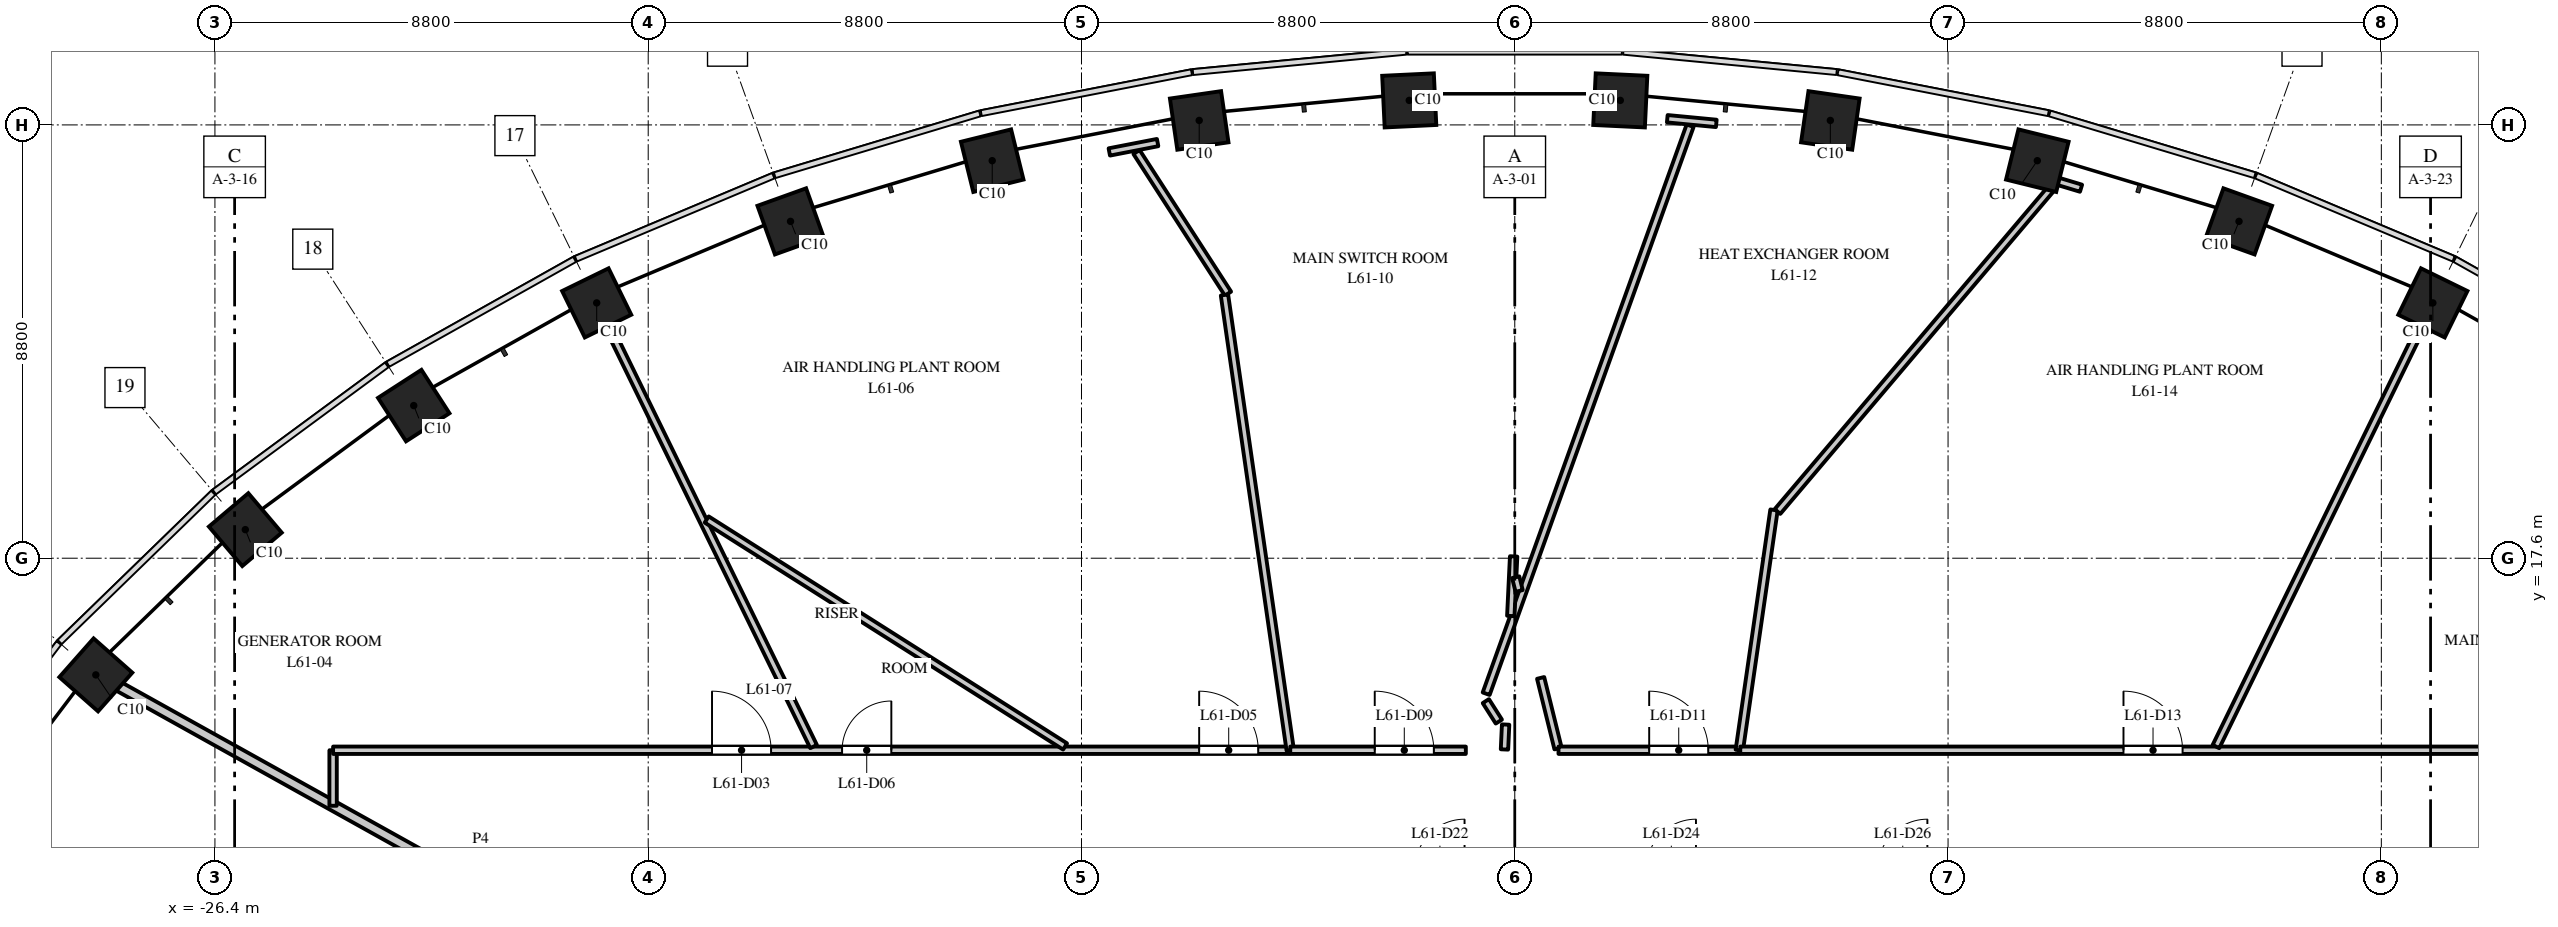
"""IFC4 building model, lengths in metres.
Left out: names, types, materials, properties, quantities, classifications, styles, units other than length and angle.
Written with IfcOpenShell. Run it as: python <this file> out.ifc"""

import sys

from ifc_helpers import new_model, si_unit, direction, frame, frame_2d, origin, origin_2d, place, context, subcontext, project, spatial, rectangle, extrude, element, fill, save


model = new_model("IFC4")
c1 = context("Model", 3, precision=1e-05, world=origin(), true_north=direction((0.0, 1.0)))
c2 = subcontext(c1, "Body", "Model", "MODEL_VIEW")
j1 = project(units=[si_unit("LENGTHUNIT", "METRE"), si_unit("PLANEANGLEUNIT", "RADIAN")], contexts=[c1])
p1 = place(None, origin())
s1 = spatial("IfcSite", under=j1, at=p1, CompositionType="ELEMENT")
p2 = place(p1, origin())
s2 = spatial("IfcBuilding", under=s1, at=p2, CompositionType="ELEMENT")
p3 = place(p2, frame((0.0, 0.0, 285.5)))
s3 = spatial("IfcBuildingStorey", under=s2, at=p3, CompositionType="ELEMENT", Elevation=285.5)
for number, where, z_axis, x_axis in (
    (1, (18.646, 22.785, 0.0), (0.0, 0.0, 1.0), (-0.898, 0.439, 0.0)),
    (2, (14.709, 24.441, 0.0), (0.0, 0.0, 1.0), (-0.941, 0.338, 0.0)),
    (3, (10.613, 25.674, 0.0), (0.0, 0.0, 1.0), (-0.971, 0.24, 0.0)),
    (4, (6.409, 26.491, 0.0), (0.0, 0.0, 1.0), (-0.99, 0.143, 0.0)),
    (5, (2.143, 26.898, 0.0), (0.0, 0.0, 1.0), (-0.999, 0.048, 0.0)),
    (6, (-2.143, 26.898, 0.0), (0.0, 0.0, 1.0), (-0.999, -0.048, 0.0)),
    (7, (-6.409, 26.491, 0.0), (0.0, 0.0, 1.0), (-0.99, -0.143, 0.0)),
    (8, (-10.613, 25.674, 0.0), (0.0, 0.0, 1.0), (-0.971, -0.24, 0.0)),
    (9, (-14.709, 24.441, 0.0), (0.0, 0.0, 1.0), (-0.941, -0.338, 0.0)),
    (10, (-18.646, 22.785, 0.0), (0.0, 0.0, 1.0), (-0.898, -0.439, 0.0)),
    (11, (-22.362, 20.7, 0.0), (0.0, 0.0, 1.0), (-0.84, -0.542, 0.0)),
    (12, (-25.783, 18.18, 0.0), (0.0, 0.0, 1.0), (-0.763, -0.646, 0.0)),
    (13, (-28.819, 15.23, 0.0), (0.0, 0.0, 1.0), (-0.663, -0.749, 0.0)),
):
    element("IfcColumn", number, at=place(p3, frame(where, z_axis=z_axis, x_axis=x_axis)), inside=s3, PredefinedType="COLUMN", context=c2, shape_type="SweptSolid", body=[
        extrude(rectangle(XDim=1.05, YDim=1.05, at=origin_2d()), origin(), (0.0, 0.0, 1.0), 5.5),
    ])
p4 = place(p3, frame((-28.893, 15.297, 0.0), z_axis=(0.0, 0.0, 1.0), x_axis=(0.873687771475, -0.486487078939, 0.0)))
e14 = element("IfcWall", 14, at=p4, inside=s3, PredefinedType="PARTITIONING", context=c2, shape_type="SweptSolid", body=[
    extrude(rectangle(XDim=9.034, YDim=0.2, at=frame_2d((4.517, 0.0))), origin(), (0.0, 0.0, 1.0), 5.2),
])
p5 = place(p3, frame((-24.0, 12.573, 0.0), z_axis=(0.0, 0.0, 1.0), x_axis=(0.0, 1.0, 0.0)))
e15 = element("IfcWall", 15, at=p5, inside=s3, PredefinedType="PARTITIONING", context=c2, shape_type="SweptSolid", body=[
    extrude(rectangle(XDim=1.127, YDim=0.15, at=frame_2d((0.564, 0.0))), origin(), (0.0, 0.0, 1.0), 5.2),
])
p6 = place(p3, frame((-24.0, 13.7, 0.0), z_axis=(0.0, 0.0, 1.0), x_axis=(1.0, 0.0, 0.0)))
e16 = element("IfcWall", 16, at=p6, inside=s3, PredefinedType="PARTITIONING", context=c2, shape_type="SweptSolid", body=[
    extrude(rectangle(XDim=19.42, YDim=0.15, at=frame_2d((9.71, 0.0))), origin(), (0.0, 0.0, 1.0), 4.25),
])
p7 = place(p6, frame((7.696, 0.0, 0.0)))
e17 = element("IfcOpeningElement", 17, at=p7, cuts=e16, PredefinedType="OPENING", context=c2, shape_type="SweptSolid", body=[
    extrude(rectangle(XDim=1.2, YDim=2.1, at=frame_2d((0.6, 1.05))), frame((0.0, 0.085, 0.0), z_axis=(0.0, -1.0, 0.0), x_axis=(1.0, 0.0, 0.0)), (0.0, 0.0, 1.0), 0.17),
])
p8 = place(p6, frame((17.59, 0.0, 0.0)))
e18 = element("IfcOpeningElement", 18, at=p8, cuts=e16, PredefinedType="OPENING", context=c2, shape_type="SweptSolid", body=[
    extrude(rectangle(XDim=1.2, YDim=2.1, at=frame_2d((0.6, 1.05))), frame((0.0, 0.085, 0.0), z_axis=(0.0, -1.0, 0.0), x_axis=(1.0, 0.0, 0.0)), (0.0, 0.0, 1.0), 0.17),
])
p9 = place(p6, frame((10.338, 0.0, 0.0)))
e19 = element("IfcOpeningElement", 19, at=p9, cuts=e16, PredefinedType="OPENING", context=c2, shape_type="SweptSolid", body=[
    extrude(rectangle(XDim=1.0, YDim=2.1, at=frame_2d((0.5, 1.05))), frame((0.0, 0.085, 0.0), z_axis=(0.0, -1.0, 0.0), x_axis=(1.0, 0.0, 0.0)), (0.0, 0.0, 1.0), 0.17),
])
p10 = place(p3, frame((-18.69, 22.875, 0.0), z_axis=(0.0, 0.0, 1.0), x_axis=(0.439213157978, -0.898382881548, 0.0)))
e20 = element("IfcWall", 20, at=p10, inside=s3, PredefinedType="PARTITIONING", context=c2, shape_type="SweptSolid", body=[
    extrude(rectangle(XDim=10.129, YDim=0.15, at=frame_2d((5.065, 0.0))), origin(), (0.0, 0.0, 1.0), 4.35),
])
p11 = place(p3, frame((-16.412, 18.386, 0.0), z_axis=(0.0, 0.0, 1.0), x_axis=(0.844880980816, -0.534954323523, 0.0)))
e21 = element("IfcWall", 21, at=p11, inside=s3, PredefinedType="PARTITIONING", context=c2, shape_type="SweptSolid", body=[
    extrude(rectangle(XDim=8.615, YDim=0.15, at=frame_2d((4.308, 0.0))), origin(), (0.0, 0.0, 1.0), 4.35),
])
p12 = place(p3, frame((-7.683, 25.85, 0.0), z_axis=(0.0, 0.0, 1.0), x_axis=(0.542618686321, -0.839979143346, 0.0)))
e22 = element("IfcWall", 22, at=p12, inside=s3, PredefinedType="PARTITIONING", context=c2, shape_type="SweptSolid", body=[
    extrude(rectangle(XDim=3.425, YDim=0.15, at=frame_2d((1.713, 0.0))), origin(), (0.0, 0.0, 1.0), 4.4),
])
p13 = place(p3, frame((-5.896, 22.946, 0.0), z_axis=(0.0, 0.0, 1.0), x_axis=(0.143001721329, -0.989722439726, 0.0)))
e23 = element("IfcWall", 23, at=p13, inside=s3, PredefinedType="PARTITIONING", context=c2, shape_type="SweptSolid", body=[
    extrude(rectangle(XDim=9.342, YDim=0.15, at=frame_2d((4.671, 0.0))), origin(), (0.0, 0.0, 1.0), 5.2),
])
p14 = place(p3, frame((-4.56, 13.7, 0.0), z_axis=(0.0, 0.0, 1.0), x_axis=(1.0, 0.0, 0.0)))
e24 = element("IfcWall", 24, at=p14, inside=s3, PredefinedType="PARTITIONING", context=c2, shape_type="SweptSolid", body=[
    extrude(rectangle(XDim=3.566, YDim=0.15, at=frame_2d((1.783, 0.0))), origin(), (0.0, 0.0, 1.0), 4.35),
])
p15 = place(p14, frame((1.716, 0.0, 0.0)))
e25 = element("IfcOpeningElement", 25, at=p15, cuts=e24, PredefinedType="OPENING", context=c2, shape_type="SweptSolid", body=[
    extrude(rectangle(XDim=1.2, YDim=2.1, at=frame_2d((0.6, 1.05))), frame((0.0, 0.085, 0.0), z_axis=(0.0, -1.0, 0.0), x_axis=(1.0, 0.0, 0.0)), (0.0, 0.0, 1.0), 0.17),
])
p16 = place(p3, frame((-0.581, 14.848, 0.0), z_axis=(0.0, 0.0, 1.0), x_axis=(0.337959757209, 0.941160561492, 0.0)))
e26 = element("IfcWall", 26, at=p16, inside=s3, PredefinedType="PARTITIONING", context=c2, shape_type="SweptSolid", body=[
    extrude(rectangle(XDim=12.258, YDim=0.15, at=frame_2d((6.129, 0.0))), origin(), (0.0, 0.0, 1.0), 4.4),
])
p17 = place(p3, frame((-0.209, 13.716, 0.0), z_axis=(0.0, 0.0, 1.0), x_axis=(0.045320181561, 0.998972512707, 0.0)))
e27 = element("IfcWall", 27, at=p17, inside=s3, PredefinedType="PARTITIONING", context=c2, shape_type="SweptSolid", body=[
    extrude(rectangle(XDim=0.506, YDim=0.15, at=frame_2d((0.253, 0.0))), origin(), (0.0, 0.0, 1.0), 5.2),
])
p18 = place(p3, frame((-0.081, 16.427, 0.0), z_axis=(0.0, 0.0, 1.0), x_axis=(0.047967320325, 0.998848905581, 0.0)))
e28 = element("IfcWall", 28, at=p18, inside=s3, PredefinedType="PARTITIONING", context=c2, shape_type="SweptSolid", body=[
    extrude(rectangle(XDim=1.211, YDim=0.15, at=frame_2d((0.606, 0.0))), origin(), (0.0, 0.0, 1.0), 5.2),
])
p19 = place(p3, frame((0.019, 17.215, 0.0), z_axis=(0.0, 0.0, 1.0), x_axis=(0.242734623519, -0.970092728838, 0.0)))
e29 = element("IfcWall", 29, at=p19, inside=s3, PredefinedType="PARTITIONING", context=c2, shape_type="SweptSolid", body=[
    extrude(rectangle(XDim=0.289, YDim=0.15, at=frame_2d((0.144, 0.0))), origin(), (0.0, 0.0, 1.0), 5.2),
])
p20 = place(p3, frame((0.525, 15.169, 0.0), z_axis=(0.0, 0.0, 1.0), x_axis=(0.239695194895, -0.970848192842, 0.0)))
e30 = element("IfcWall", 30, at=p20, inside=s3, PredefinedType="PARTITIONING", context=c2, shape_type="SweptSolid", body=[
    extrude(rectangle(XDim=1.477, YDim=0.15, at=frame_2d((0.738, 0.0))), origin(), (0.0, 0.0, 1.0), 5.2),
])
p21 = place(p3, frame((0.888, 13.7, 0.0), z_axis=(0.0, 0.0, 1.0), x_axis=(1.0, 0.0, 0.0)))
e31 = element("IfcWall", 31, at=p21, inside=s3, PredefinedType="PARTITIONING", context=c2, shape_type="SweptSolid", body=[
    extrude(rectangle(XDim=3.672, YDim=0.15, at=frame_2d((1.836, 0.0))), origin(), (0.0, 0.0, 1.0), 4.35),
])
p22 = place(p21, frame((1.842, 0.0, 0.0)))
e32 = element("IfcOpeningElement", 32, at=p22, cuts=e31, PredefinedType="OPENING", context=c2, shape_type="SweptSolid", body=[
    extrude(rectangle(XDim=1.2, YDim=2.1, at=frame_2d((0.6, 1.05))), frame((0.0, 0.085, 0.0), z_axis=(0.0, -1.0, 0.0), x_axis=(1.0, 0.0, 0.0)), (0.0, 0.0, 1.0), 0.17),
])
p23 = place(p3, frame((4.56, 13.7, 0.0), z_axis=(0.0, 0.0, 1.0), x_axis=(0.142946212099, 0.989730458482, 0.0)))
e33 = element("IfcWall", 33, at=p23, inside=s3, PredefinedType="PARTITIONING", context=c2, shape_type="SweptSolid", body=[
    extrude(rectangle(XDim=4.931, YDim=0.15, at=frame_2d((2.465, 0.0))), origin(), (0.0, 0.0, 1.0), 5.2),
])
p24 = place(p3, frame((4.58, 13.7, 0.0), z_axis=(0.0, 0.0, 1.0), x_axis=(1.0, 0.0, 0.0)))
e34 = element("IfcWall", 34, at=p24, inside=s3, PredefinedType="PARTITIONING", context=c2, shape_type="SweptSolid", body=[
    extrude(rectangle(XDim=19.42, YDim=0.15, at=frame_2d((9.71, 0.0))), origin(), (0.0, 0.0, 1.0), 4.35),
])
p25 = place(p24, frame((7.783, 0.0, 0.0)))
e35 = element("IfcOpeningElement", 35, at=p25, cuts=e34, PredefinedType="OPENING", context=c2, shape_type="SweptSolid", body=[
    extrude(rectangle(XDim=1.2, YDim=2.1, at=frame_2d((0.6, 1.05))), frame((0.0, 0.085, 0.0), z_axis=(0.0, -1.0, 0.0), x_axis=(1.0, 0.0, 0.0)), (0.0, 0.0, 1.0), 0.17),
])
p26 = place(p24, frame((17.57, 0.0, 0.0)))
e36 = element("IfcOpeningElement", 36, at=p26, cuts=e34, PredefinedType="OPENING", context=c2, shape_type="SweptSolid", body=[
    extrude(rectangle(XDim=1.2, YDim=2.1, at=frame_2d((0.6, 1.05))), frame((0.0, 0.085, 0.0), z_axis=(0.0, -1.0, 0.0), x_axis=(1.0, 0.0, 0.0)), (0.0, 0.0, 1.0), 0.17),
])
p27 = place(p3, frame((5.336, 18.548, 0.0), z_axis=(0.0, 0.0, 1.0), x_axis=(0.646514481534, 0.762901713962, 0.0)))
e37 = element("IfcWall", 37, at=p27, inside=s3, PredefinedType="PARTITIONING", context=c2, shape_type="SweptSolid", body=[
    extrude(rectangle(XDim=8.68, YDim=0.15, at=frame_2d((4.34, 0.0))), origin(), (0.0, 0.0, 1.0), 4.4),
])
p28 = place(p3, frame((14.241, 13.775, 0.0), z_axis=(0.0, 0.0, 1.0), x_axis=(0.439213157978, 0.898382881548, 0.0)))
e38 = element("IfcWall", 38, at=p28, inside=s3, PredefinedType="PARTITIONING", context=c2, shape_type="SweptSolid", body=[
    extrude(rectangle(XDim=10.129, YDim=0.15, at=frame_2d((5.065, 0.0))), origin(), (0.0, 0.0, 1.0), 5.2),
])
p29 = place(p3, frame((-0.588, 14.698, 0.0), z_axis=(0.0, 0.0, 1.0), x_axis=(0.537099689422, -0.843518774908, 0.0)))
e39 = element("IfcWall", 39, at=p29, inside=s3, PredefinedType="PARTITIONING", context=c2, shape_type="SweptSolid", body=[
    extrude(rectangle(XDim=0.493, YDim=0.15, at=frame_2d((0.247, 0.0))), origin(), (0.0, 0.0, 1.0), 5.2),
])
p30 = place(p3, frame((-7.254, 26.042, 0.0), z_axis=(0.0, 0.0, 1.0), x_axis=(-0.981609036544, -0.190902329415, 0.0)))
e40 = element("IfcWall", 40, at=p30, inside=s3, PredefinedType="PARTITIONING", context=c2, shape_type="SweptSolid", body=[
    extrude(rectangle(XDim=1.0, YDim=0.15, at=frame_2d((0.5, 0.0))), origin(), (0.0, 0.0, 1.0), 5.2),
])
p31 = place(p3, frame((4.093, 26.431, 0.0), z_axis=(0.0, 0.0, 1.0), x_axis=(-0.995481198714, 0.094958849019, 0.0)))
e41 = element("IfcWall", 41, at=p31, inside=s3, PredefinedType="PARTITIONING", context=c2, shape_type="SweptSolid", body=[
    extrude(rectangle(XDim=1.0, YDim=0.15, at=frame_2d((0.5, 0.0))), origin(), (0.0, 0.0, 1.0), 5.2),
])
p32 = place(p3, frame((11.501, 25.114, 0.0), z_axis=(0.0, 0.0, 1.0), x_axis=(-0.957586840279, 0.288144830467, 0.0)))
e42 = element("IfcWall", 42, at=p32, inside=s3, PredefinedType="PARTITIONING", context=c2, shape_type="SweptSolid", body=[
    extrude(rectangle(XDim=0.506, YDim=0.15, at=frame_2d((0.253, 0.0))), origin(), (0.0, 0.0, 1.0), 5.2),
])
p33 = place(p7, origin())
e43 = element("IfcDoor", 43, at=p33, inside=s3, OperationType="SINGLE_SWING_LEFT", PredefinedType="DOOR", context=c2, shape_type="SweptSolid", body=[
    extrude(rectangle(XDim=1.2, YDim=2.1, at=frame_2d((0.6, 1.05))), frame((0.0, 0.025, 0.0), z_axis=(0.0, -1.0, 0.0), x_axis=(1.0, 0.0, 0.0)), (0.0, 0.0, 1.0), 0.05),
])
fill(e17, e43)
p34 = place(p8, origin())
e44 = element("IfcDoor", 44, at=p34, inside=s3, OperationType="SINGLE_SWING_LEFT", PredefinedType="DOOR", context=c2, shape_type="SweptSolid", body=[
    extrude(rectangle(XDim=1.2, YDim=2.1, at=frame_2d((0.6, 1.05))), frame((0.0, 0.025, 0.0), z_axis=(0.0, -1.0, 0.0), x_axis=(1.0, 0.0, 0.0)), (0.0, 0.0, 1.0), 0.05),
])
fill(e18, e44)
p35 = place(p9, origin())
e45 = element("IfcDoor", 45, at=p35, inside=s3, OperationType="SINGLE_SWING_RIGHT", PredefinedType="DOOR", context=c2, shape_type="SweptSolid", body=[
    extrude(rectangle(XDim=1.0, YDim=2.1, at=frame_2d((0.5, 1.05))), frame((0.0, 0.025, 0.0), z_axis=(0.0, -1.0, 0.0), x_axis=(1.0, 0.0, 0.0)), (0.0, 0.0, 1.0), 0.05),
])
fill(e19, e45)
p36 = place(p15, origin())
e46 = element("IfcDoor", 46, at=p36, inside=s3, OperationType="SINGLE_SWING_LEFT", PredefinedType="DOOR", context=c2, shape_type="SweptSolid", body=[
    extrude(rectangle(XDim=1.2, YDim=2.1, at=frame_2d((0.6, 1.05))), frame((0.0, 0.025, 0.0), z_axis=(0.0, -1.0, 0.0), x_axis=(1.0, 0.0, 0.0)), (0.0, 0.0, 1.0), 0.05),
])
fill(e25, e46)
p37 = place(p22, origin())
e47 = element("IfcDoor", 47, at=p37, inside=s3, OperationType="SINGLE_SWING_LEFT", PredefinedType="DOOR", context=c2, shape_type="SweptSolid", body=[
    extrude(rectangle(XDim=1.2, YDim=2.1, at=frame_2d((0.6, 1.05))), frame((0.0, 0.025, 0.0), z_axis=(0.0, -1.0, 0.0), x_axis=(1.0, 0.0, 0.0)), (0.0, 0.0, 1.0), 0.05),
])
fill(e32, e47)
p38 = place(p25, origin())
e48 = element("IfcDoor", 48, at=p38, inside=s3, OperationType="SINGLE_SWING_LEFT", PredefinedType="DOOR", context=c2, shape_type="SweptSolid", body=[
    extrude(rectangle(XDim=1.2, YDim=2.1, at=frame_2d((0.6, 1.05))), frame((0.0, 0.025, 0.0), z_axis=(0.0, -1.0, 0.0), x_axis=(1.0, 0.0, 0.0)), (0.0, 0.0, 1.0), 0.05),
])
fill(e35, e48)
save(model, sys.argv[1])
